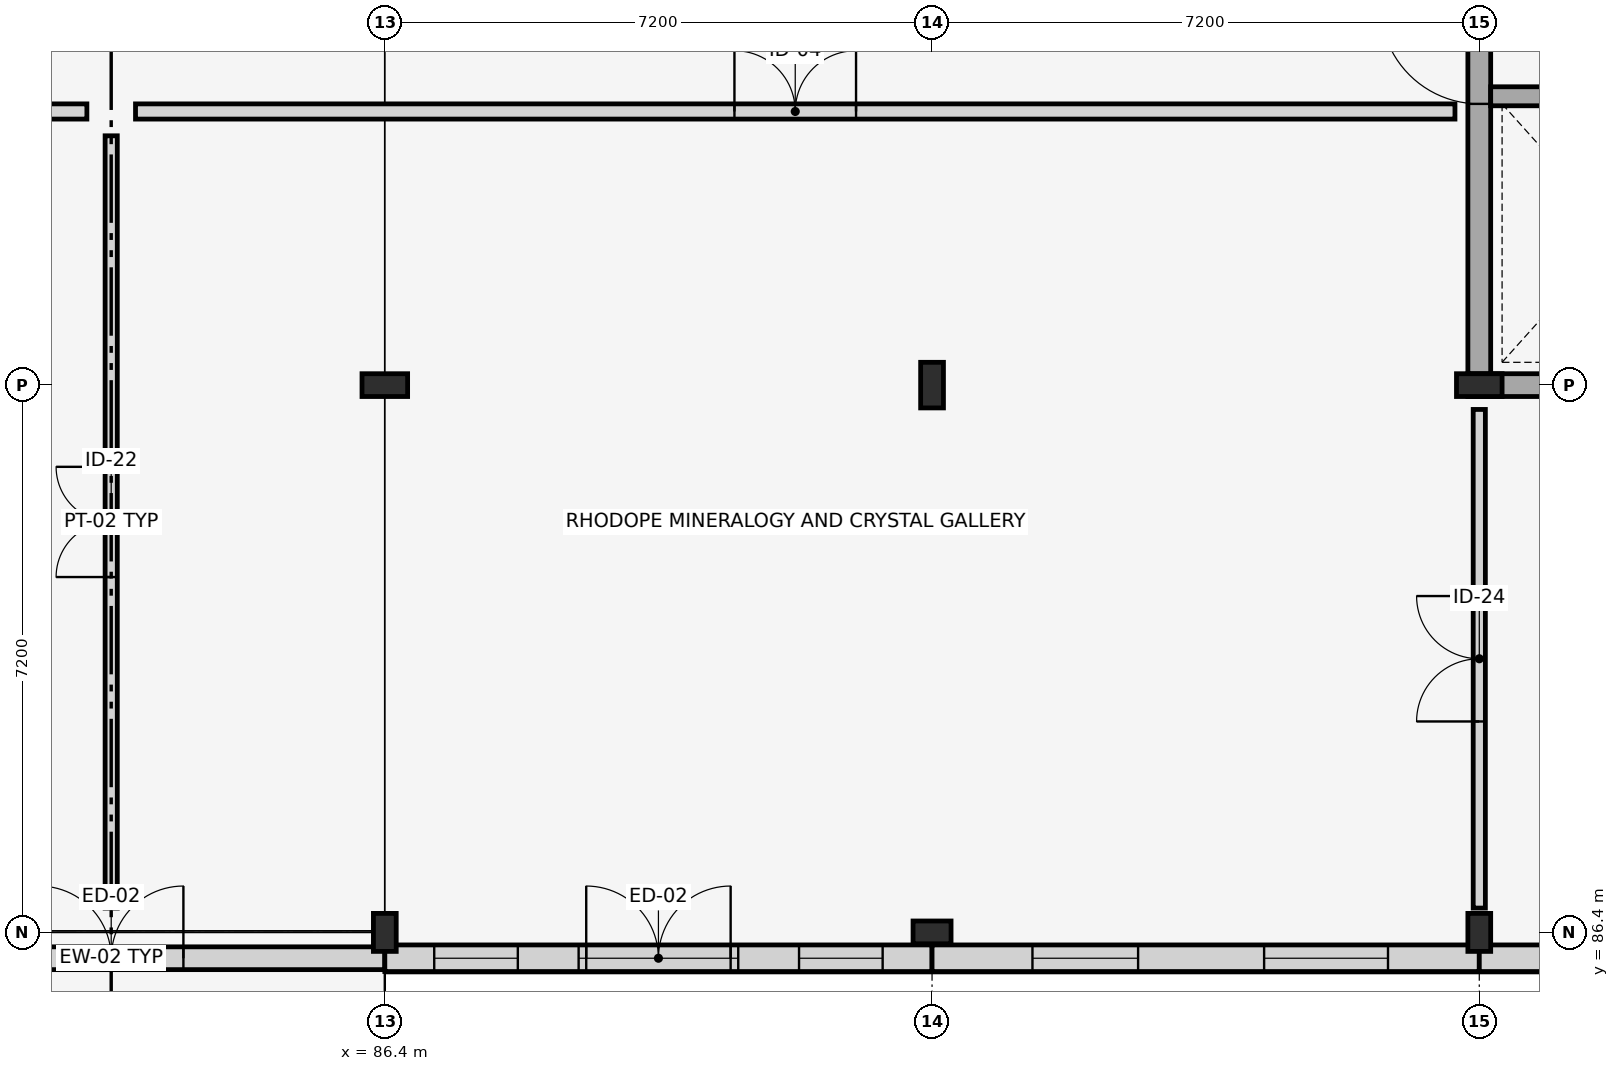
"""IFC4 building model, lengths in metres.
Left out: names, types, materials, properties, quantities, classifications, styles, units other than length and angle.
Written with IfcOpenShell. Run it as: python <this file> out.ifc"""

import sys

from ifc_helpers import new_model, si_unit, direction, frame, frame_2d, origin, origin_2d, place, context, subcontext, project, spatial, rectangle, i_section, extrude, element, fill, save


model = new_model("IFC4")
c1 = context("Model", 3, precision=1e-05, world=origin(), true_north=direction((0.0, 1.0)))
c2 = subcontext(c1, "Body", "Model", "MODEL_VIEW")
j1 = project(units=[si_unit("LENGTHUNIT", "METRE"), si_unit("PLANEANGLEUNIT", "RADIAN")], contexts=[c1])
p1 = place(None, origin())
s1 = spatial("IfcSite", under=j1, at=p1, CompositionType="ELEMENT")
p2 = place(p1, origin())
s2 = spatial("IfcBuilding", under=s1, at=p2, CompositionType="ELEMENT")
p3 = place(p2, origin())
s3 = spatial("IfcBuildingStorey", under=s2, at=p3, CompositionType="ELEMENT", Elevation=0.0)
p4 = place(p3, frame((86.4, 86.4, 0.0), z_axis=(0.0, 0.0, 1.0), x_axis=(1.0, 0.0, 0.0)))
e1 = element("IfcColumn", 1, at=p4, inside=s3, PredefinedType="COLUMN", context=c2, shape_type="SweptSolid", body=[
    extrude(i_section(OverallWidth=0.3, OverallDepth=0.5, WebThickness=0.014, FlangeThickness=0.028, FilletRadius=0.027, at=origin_2d()), origin(), (0.0, 0.0, 1.0), 4.5),
])
p5 = place(p3, frame((86.4, 93.6, 0.0), z_axis=(0.0, 0.0, 1.0), x_axis=(0.0, 1.0, 0.0)))
e2 = element("IfcColumn", 2, at=p5, inside=s3, PredefinedType="COLUMN", context=c2, shape_type="SweptSolid", body=[
    extrude(i_section(OverallWidth=0.3, OverallDepth=0.6, WebThickness=0.015, FlangeThickness=0.03, FilletRadius=0.027, at=origin_2d()), origin(), (0.0, 0.0, 1.0), 4.5),
])
p6 = place(p3, frame((93.6, 86.4, 0.0), z_axis=(0.0, 0.0, 1.0), x_axis=(0.0, 1.0, 0.0)))
e3 = element("IfcColumn", 3, at=p6, inside=s3, PredefinedType="COLUMN", context=c2, shape_type="SweptSolid", body=[
    extrude(i_section(OverallWidth=0.3, OverallDepth=0.5, WebThickness=0.014, FlangeThickness=0.028, FilletRadius=0.027, at=origin_2d()), origin(), (0.0, 0.0, 1.0), 4.5),
])
p7 = place(p3, frame((93.6, 93.6, 0.0), z_axis=(0.0, 0.0, 1.0), x_axis=(1.0, 0.0, 0.0)))
e4 = element("IfcColumn", 4, at=p7, inside=s3, PredefinedType="COLUMN", context=c2, shape_type="SweptSolid", body=[
    extrude(i_section(OverallWidth=0.3, OverallDepth=0.6, WebThickness=0.015, FlangeThickness=0.03, FilletRadius=0.027, at=origin_2d()), origin(), (0.0, 0.0, 1.0), 4.5),
])
p8 = place(p3, frame((100.8, 86.4, 0.0), z_axis=(0.0, 0.0, 1.0), x_axis=(1.0, 0.0, 0.0)))
e5 = element("IfcColumn", 5, at=p8, inside=s3, PredefinedType="COLUMN", context=c2, shape_type="SweptSolid", body=[
    extrude(i_section(OverallWidth=0.3, OverallDepth=0.5, WebThickness=0.014, FlangeThickness=0.028, FilletRadius=0.027, at=origin_2d()), origin(), (0.0, 0.0, 1.0), 4.5),
])
p9 = place(p3, frame((100.8, 93.6, 0.0), z_axis=(0.0, 0.0, 1.0), x_axis=(0.0, 1.0, 0.0)))
e6 = element("IfcColumn", 6, at=p9, inside=s3, PredefinedType="COLUMN", context=c2, shape_type="SweptSolid", body=[
    extrude(i_section(OverallWidth=0.3, OverallDepth=0.6, WebThickness=0.015, FlangeThickness=0.03, FilletRadius=0.027, at=origin_2d()), origin(), (0.0, 0.0, 1.0), 4.5),
])
p10 = place(p3, frame((79.2, 86.06, 0.0), z_axis=(0.0, 0.0, 1.0), x_axis=(1.0, 0.0, 0.0)))
e7 = element("IfcWall", 7, at=p10, inside=s3, PredefinedType="STANDARD", context=c2, shape_type="SweptSolid", body=[
    extrude(rectangle(XDim=7.2, YDim=0.3, at=frame_2d((3.6, 0.0))), origin(), (0.0, 0.0, 1.0), 3.95),
])
p11 = place(p10, frame((2.65, 0.0, 0.0)))
e8 = element("IfcOpeningElement", 8, at=p11, cuts=e7, PredefinedType="OPENING", context=c2, shape_type="SweptSolid", body=[
    extrude(rectangle(XDim=1.9, YDim=2.45, at=frame_2d((0.95, 1.225))), frame((0.0, 0.16, 0.0), z_axis=(0.0, -1.0, 0.0), x_axis=(1.0, 0.0, 0.0)), (0.0, 0.0, 1.0), 0.32),
])
p12 = place(p3, frame((86.4, 86.06, 0.0), z_axis=(0.0, 0.0, 1.0), x_axis=(1.0, 0.0, 0.0)))
e9 = element("IfcWall", 9, at=p12, inside=s3, PredefinedType="STANDARD", context=c2, shape_type="SweptSolid", body=[
    extrude(rectangle(XDim=7.2, YDim=0.35, at=frame_2d((3.6, 0.0))), origin(), (0.0, 0.0, 1.0), 4.5),
])
p13 = place(p12, frame((2.65, 0.0, 0.0)))
e10 = element("IfcOpeningElement", 10, at=p13, cuts=e9, PredefinedType="OPENING", context=c2, shape_type="SweptSolid", body=[
    extrude(rectangle(XDim=1.9, YDim=2.45, at=frame_2d((0.95, 1.225))), frame((0.0, 0.185, 0.0), z_axis=(0.0, -1.0, 0.0), x_axis=(1.0, 0.0, 0.0)), (0.0, 0.0, 1.0), 0.37),
])
p14 = place(p12, frame((2.55, 0.0, 2.6)))
e11 = element("IfcOpeningElement", 11, at=p14, cuts=e9, PredefinedType="OPENING", context=c2, shape_type="SweptSolid", body=[
    extrude(rectangle(XDim=2.1, YDim=1.15, at=frame_2d((1.05, 0.575))), frame((0.0, 0.185, 0.0), z_axis=(0.0, -1.0, 0.0), x_axis=(1.0, 0.0, 0.0)), (0.0, 0.0, 1.0), 0.37),
])
p15 = place(p12, frame((0.65, 0.0, 0.35)))
e12 = element("IfcOpeningElement", 12, at=p15, cuts=e9, PredefinedType="OPENING", context=c2, shape_type="SweptSolid", body=[
    extrude(rectangle(XDim=1.1, YDim=2.0, at=frame_2d((0.55, 1.0))), frame((0.0, 0.185, 0.0), z_axis=(0.0, -1.0, 0.0), x_axis=(1.0, 0.0, 0.0)), (0.0, 0.0, 1.0), 0.37),
])
p16 = place(p12, frame((5.45, 0.0, 0.35)))
e13 = element("IfcOpeningElement", 13, at=p16, cuts=e9, PredefinedType="OPENING", context=c2, shape_type="SweptSolid", body=[
    extrude(rectangle(XDim=1.1, YDim=2.0, at=frame_2d((0.55, 1.0))), frame((0.0, 0.185, 0.0), z_axis=(0.0, -1.0, 0.0), x_axis=(1.0, 0.0, 0.0)), (0.0, 0.0, 1.0), 0.37),
])
p17 = place(p3, frame((93.6, 86.06, 0.0), z_axis=(0.0, 0.0, 1.0), x_axis=(1.0, 0.0, 0.0)))
e14 = element("IfcWall", 14, at=p17, inside=s3, PredefinedType="STANDARD", context=c2, shape_type="SweptSolid", body=[
    extrude(rectangle(XDim=7.2, YDim=0.35, at=frame_2d((3.6, 0.0))), origin(), (0.0, 0.0, 1.0), 4.5),
])
p18 = place(p17, frame((1.321, 0.0, 0.9)))
e15 = element("IfcOpeningElement", 15, at=p18, cuts=e14, PredefinedType="OPENING", context=c2, shape_type="SweptSolid", body=[
    extrude(rectangle(XDim=1.39, YDim=1.68, at=frame_2d((0.695, 0.84))), frame((0.0, 0.185, 0.0), z_axis=(0.0, -1.0, 0.0), x_axis=(1.0, 0.0, 0.0)), (0.0, 0.0, 1.0), 0.37),
])
p19 = place(p17, frame((4.369, 0.0, 0.9)))
e16 = element("IfcOpeningElement", 16, at=p19, cuts=e14, PredefinedType="OPENING", context=c2, shape_type="SweptSolid", body=[
    extrude(rectangle(XDim=1.63, YDim=1.68, at=frame_2d((0.815, 0.84))), frame((0.0, 0.185, 0.0), z_axis=(0.0, -1.0, 0.0), x_axis=(1.0, 0.0, 0.0)), (0.0, 0.0, 1.0), 0.37),
])
p20 = place(p3, frame((100.8, 86.06, 0.0), z_axis=(0.0, 0.0, 1.0), x_axis=(1.0, 0.0, 0.0)))
e17 = element("IfcWall", 17, at=p20, inside=s3, PredefinedType="STANDARD", context=c2, shape_type="SweptSolid", body=[
    extrude(rectangle(XDim=7.365, YDim=0.35, at=frame_2d((3.683, 0.0))), origin(), (0.0, 0.0, 1.0), 4.5),
])
p21 = place(p20, frame((1.081, 0.0, 0.9)))
e18 = element("IfcOpeningElement", 18, at=p21, cuts=e17, PredefinedType="OPENING", context=c2, shape_type="SweptSolid", body=[
    extrude(rectangle(XDim=1.87, YDim=1.68, at=frame_2d((0.935, 0.84))), frame((0.0, 0.185, 0.0), z_axis=(0.0, -1.0, 0.0), x_axis=(1.0, 0.0, 0.0)), (0.0, 0.0, 1.0), 0.37),
])
p22 = place(p20, frame((4.129, 0.0, 0.9)))
e19 = element("IfcOpeningElement", 19, at=p22, cuts=e17, PredefinedType="OPENING", context=c2, shape_type="SweptSolid", body=[
    extrude(rectangle(XDim=2.11, YDim=1.68, at=frame_2d((1.055, 0.84))), frame((0.0, 0.185, 0.0), z_axis=(0.0, -1.0, 0.0), x_axis=(1.0, 0.0, 0.0)), (0.0, 0.0, 1.0), 0.37),
])
p23 = place(p3, frame((100.65, 93.6, 0.0), z_axis=(0.0, 0.0, 1.0), x_axis=(1.0, 0.0, 0.0)))
e20 = element("IfcWall", 20, at=p23, inside=s3, PredefinedType="SHEAR", context=c2, shape_type="SweptSolid", body=[
    extrude(rectangle(XDim=7.35, YDim=0.3, at=frame_2d((3.675, 0.0))), origin(), (0.0, 0.0, 1.0), 4.28),
])
p24 = place(p3, frame((100.8, 93.75, 0.0), z_axis=(0.0, 0.0, 1.0), x_axis=(0.0, 1.0, 0.0)))
e21 = element("IfcWall", 21, at=p24, inside=s3, PredefinedType="SHEAR", context=c2, shape_type="SweptSolid", body=[
    extrude(rectangle(XDim=14.1, YDim=0.3, at=frame_2d((7.05, 0.0))), origin(), (0.0, 0.0, 1.0), 4.28),
])
p25 = place(p24, frame((3.55, 0.0, 0.0)))
e22 = element("IfcOpeningElement", 22, at=p25, cuts=e21, PredefinedType="OPENING", context=c2, shape_type="SweptSolid", body=[
    extrude(rectangle(XDim=1.3, YDim=2.2, at=frame_2d((0.65, 1.1))), frame((0.0, 0.16, 0.0), z_axis=(0.0, -1.0, 0.0), x_axis=(1.0, 0.0, 0.0)), (0.0, 0.0, 1.0), 0.32),
])
p26 = place(p24, frame((7.85, 0.0, 0.0)))
e23 = element("IfcOpeningElement", 23, at=p26, cuts=e21, PredefinedType="OPENING", context=c2, shape_type="SweptSolid", body=[
    extrude(rectangle(XDim=1.05, YDim=2.15, at=frame_2d((0.525, 1.075))), frame((0.0, 0.16, 0.0), z_axis=(0.0, -1.0, 0.0), x_axis=(1.0, 0.0, 0.0)), (0.0, 0.0, 1.0), 0.32),
])
p27 = place(p24, frame((10.55, 0.0, 0.0)))
e24 = element("IfcOpeningElement", 24, at=p27, cuts=e21, PredefinedType="OPENING", context=c2, shape_type="SweptSolid", body=[
    extrude(rectangle(XDim=1.0, YDim=2.15, at=frame_2d((0.5, 1.075))), frame((0.0, 0.16, 0.0), z_axis=(0.0, -1.0, 0.0), x_axis=(1.0, 0.0, 0.0)), (0.0, 0.0, 1.0), 0.32),
])
p28 = place(p3, frame((100.95, 97.4, 0.0), z_axis=(0.0, 0.0, 1.0), x_axis=(1.0, 0.0, 0.0)))
e25 = element("IfcWall", 25, at=p28, inside=s3, PredefinedType="SHEAR", context=c2, shape_type="SweptSolid", body=[
    extrude(rectangle(XDim=3.375, YDim=0.25, at=frame_2d((1.688, 0.0))), origin(), (0.0, 0.0, 1.0), 4.28),
])
p29 = place(p3, frame((65.12, 97.2, 0.0), z_axis=(0.0, 0.0, 1.0), x_axis=(1.0, 0.0, 0.0)))
e26 = element("IfcWall", 26, at=p29, inside=s3, PredefinedType="PARTITIONING", context=c2, shape_type="SweptSolid", body=[
    extrude(rectangle(XDim=17.36, YDim=0.2, at=frame_2d((8.68, 0.0))), origin(), (0.0, 0.0, 1.0), 3.45),
])
p30 = place(p29, frame((7.93, 0.0, 0.0)))
e27 = element("IfcOpeningElement", 27, at=p30, cuts=e26, PredefinedType="OPENING", context=c2, shape_type="SweptSolid", body=[
    extrude(rectangle(XDim=1.5, YDim=2.25, at=frame_2d((0.75, 1.125))), frame((0.0, 0.11, 0.0), z_axis=(0.0, -1.0, 0.0), x_axis=(1.0, 0.0, 0.0)), (0.0, 0.0, 1.0), 0.22),
])
p31 = place(p3, frame((83.12, 97.2, 0.0), z_axis=(0.0, 0.0, 1.0), x_axis=(1.0, 0.0, 0.0)))
e28 = element("IfcWall", 28, at=p31, inside=s3, PredefinedType="PARTITIONING", context=c2, shape_type="SweptSolid", body=[
    extrude(rectangle(XDim=17.36, YDim=0.2, at=frame_2d((8.68, 0.0))), origin(), (0.0, 0.0, 1.0), 3.45),
])
p32 = place(p31, frame((7.88, 0.0, 0.0)))
e29 = element("IfcOpeningElement", 29, at=p32, cuts=e28, PredefinedType="OPENING", context=c2, shape_type="SweptSolid", body=[
    extrude(rectangle(XDim=1.6, YDim=2.35, at=frame_2d((0.8, 1.175))), frame((0.0, 0.11, 0.0), z_axis=(0.0, -1.0, 0.0), x_axis=(1.0, 0.0, 0.0)), (0.0, 0.0, 1.0), 0.22),
])
p33 = place(p3, frame((82.8, 86.72, 0.0), z_axis=(0.0, 0.0, 1.0), x_axis=(0.0, 1.0, 0.0)))
e30 = element("IfcWall", 30, at=p33, inside=s3, PredefinedType="PARTITIONING", context=c2, shape_type="SweptSolid", body=[
    extrude(rectangle(XDim=10.16, YDim=0.16, at=frame_2d((5.08, 0.0))), origin(), (0.0, 0.0, 1.0), 3.45),
])
p34 = place(p33, frame((4.355, 0.0, 0.0)))
e31 = element("IfcOpeningElement", 31, at=p34, cuts=e30, PredefinedType="OPENING", context=c2, shape_type="SweptSolid", body=[
    extrude(rectangle(XDim=1.45, YDim=2.35, at=frame_2d((0.725, 1.175))), frame((0.0, 0.09, 0.0), z_axis=(0.0, -1.0, 0.0), x_axis=(1.0, 0.0, 0.0)), (0.0, 0.0, 1.0), 0.18),
])
p35 = place(p3, frame((100.8, 86.72, 0.0), z_axis=(0.0, 0.0, 1.0), x_axis=(0.0, 1.0, 0.0)))
e32 = element("IfcWall", 32, at=p35, inside=s3, PredefinedType="PARTITIONING", context=c2, shape_type="SweptSolid", body=[
    extrude(rectangle(XDim=6.56, YDim=0.16, at=frame_2d((3.28, 0.0))), origin(), (0.0, 0.0, 1.0), 3.45),
])
p36 = place(p35, frame((2.455, 0.0, 0.0)))
e33 = element("IfcOpeningElement", 33, at=p36, cuts=e32, PredefinedType="OPENING", context=c2, shape_type="SweptSolid", body=[
    extrude(rectangle(XDim=1.65, YDim=2.45, at=frame_2d((0.825, 1.225))), frame((0.0, 0.09, 0.0), z_axis=(0.0, -1.0, 0.0), x_axis=(1.0, 0.0, 0.0)), (0.0, 0.0, 1.0), 0.18),
])
p37 = place(p11, origin())
e34 = element("IfcDoor", 34, at=p37, inside=s3, OperationType="DOUBLE_DOOR_SINGLE_SWING", PredefinedType="DOOR", context=c2, shape_type="SweptSolid", body=[
    extrude(rectangle(XDim=1.9, YDim=2.45, at=frame_2d((0.95, 1.225))), frame((0.0, 0.025, 0.0), z_axis=(0.0, -1.0, 0.0), x_axis=(1.0, 0.0, 0.0)), (0.0, 0.0, 1.0), 0.05),
])
fill(e8, e34)
p38 = place(p13, origin())
e35 = element("IfcDoor", 35, at=p38, inside=s3, OperationType="DOUBLE_DOOR_SINGLE_SWING", PredefinedType="DOOR", context=c2, shape_type="SweptSolid", body=[
    extrude(rectangle(XDim=1.9, YDim=2.45, at=frame_2d((0.95, 1.225))), frame((0.0, 0.025, 0.0), z_axis=(0.0, -1.0, 0.0), x_axis=(1.0, 0.0, 0.0)), (0.0, 0.0, 1.0), 0.05),
])
fill(e10, e35)
p39 = place(p14, origin())
e36 = element("IfcWindow", 36, at=p39, inside=s3, PartitioningType="SINGLE_PANEL", PredefinedType="WINDOW", context=c2, shape_type="SweptSolid", body=[
    extrude(rectangle(XDim=2.1, YDim=1.15, at=frame_2d((1.05, 0.575))), frame((0.0, 0.03, 0.0), z_axis=(0.0, -1.0, 0.0), x_axis=(1.0, 0.0, 0.0)), (0.0, 0.0, 1.0), 0.06),
])
fill(e11, e36)
p40 = place(p15, origin())
e37 = element("IfcWindow", 37, at=p40, inside=s3, PartitioningType="SINGLE_PANEL", PredefinedType="WINDOW", context=c2, shape_type="SweptSolid", body=[
    extrude(rectangle(XDim=1.1, YDim=2.0, at=frame_2d((0.55, 1.0))), frame((0.0, 0.03, 0.0), z_axis=(0.0, -1.0, 0.0), x_axis=(1.0, 0.0, 0.0)), (0.0, 0.0, 1.0), 0.06),
])
fill(e12, e37)
p41 = place(p16, origin())
e38 = element("IfcWindow", 38, at=p41, inside=s3, PartitioningType="SINGLE_PANEL", PredefinedType="WINDOW", context=c2, shape_type="SweptSolid", body=[
    extrude(rectangle(XDim=1.1, YDim=2.0, at=frame_2d((0.55, 1.0))), frame((0.0, 0.03, 0.0), z_axis=(0.0, -1.0, 0.0), x_axis=(1.0, 0.0, 0.0)), (0.0, 0.0, 1.0), 0.06),
])
fill(e13, e38)
p42 = place(p18, origin())
e39 = element("IfcWindow", 39, at=p42, inside=s3, PartitioningType="SINGLE_PANEL", PredefinedType="WINDOW", context=c2, shape_type="SweptSolid", body=[
    extrude(rectangle(XDim=1.39, YDim=1.68, at=frame_2d((0.695, 0.84))), frame((0.0, 0.03, 0.0), z_axis=(0.0, -1.0, 0.0), x_axis=(1.0, 0.0, 0.0)), (0.0, 0.0, 1.0), 0.06),
])
fill(e15, e39)
p43 = place(p19, origin())
e40 = element("IfcWindow", 40, at=p43, inside=s3, PartitioningType="SINGLE_PANEL", PredefinedType="WINDOW", context=c2, shape_type="SweptSolid", body=[
    extrude(rectangle(XDim=1.63, YDim=1.68, at=frame_2d((0.815, 0.84))), frame((0.0, 0.03, 0.0), z_axis=(0.0, -1.0, 0.0), x_axis=(1.0, 0.0, 0.0)), (0.0, 0.0, 1.0), 0.06),
])
fill(e16, e40)
p44 = place(p25, origin())
e41 = element("IfcDoor", 41, at=p44, inside=s3, OperationType="SINGLE_SWING_RIGHT", PredefinedType="DOOR", context=c2, shape_type="SweptSolid", body=[
    extrude(rectangle(XDim=1.3, YDim=2.2, at=frame_2d((0.65, 1.1))), frame((0.0, 0.025, 0.0), z_axis=(0.0, -1.0, 0.0), x_axis=(1.0, 0.0, 0.0)), (0.0, 0.0, 1.0), 0.05),
])
fill(e22, e41)
p45 = place(p32, origin())
e42 = element("IfcDoor", 42, at=p45, inside=s3, OperationType="DOUBLE_DOOR_SINGLE_SWING", PredefinedType="DOOR", context=c2, shape_type="SweptSolid", body=[
    extrude(rectangle(XDim=1.6, YDim=2.35, at=frame_2d((0.8, 1.175))), frame((0.0, 0.025, 0.0), z_axis=(0.0, -1.0, 0.0), x_axis=(1.0, 0.0, 0.0)), (0.0, 0.0, 1.0), 0.05),
])
fill(e29, e42)
p46 = place(p34, origin())
e43 = element("IfcDoor", 43, at=p46, inside=s3, OperationType="DOUBLE_DOOR_SINGLE_SWING", PredefinedType="DOOR", context=c2, shape_type="SweptSolid", body=[
    extrude(rectangle(XDim=1.45, YDim=2.35, at=frame_2d((0.725, 1.175))), frame((0.0, 0.025, 0.0), z_axis=(0.0, -1.0, 0.0), x_axis=(1.0, 0.0, 0.0)), (0.0, 0.0, 1.0), 0.05),
])
fill(e31, e43)
p47 = place(p36, origin())
e44 = element("IfcDoor", 44, at=p47, inside=s3, OperationType="DOUBLE_DOOR_SINGLE_SWING", PredefinedType="DOOR", context=c2, shape_type="SweptSolid", body=[
    extrude(rectangle(XDim=1.65, YDim=2.45, at=frame_2d((0.825, 1.225))), frame((0.0, 0.025, 0.0), z_axis=(0.0, -1.0, 0.0), x_axis=(1.0, 0.0, 0.0)), (0.0, 0.0, 1.0), 0.05),
])
fill(e33, e44)
save(model, sys.argv[1])
